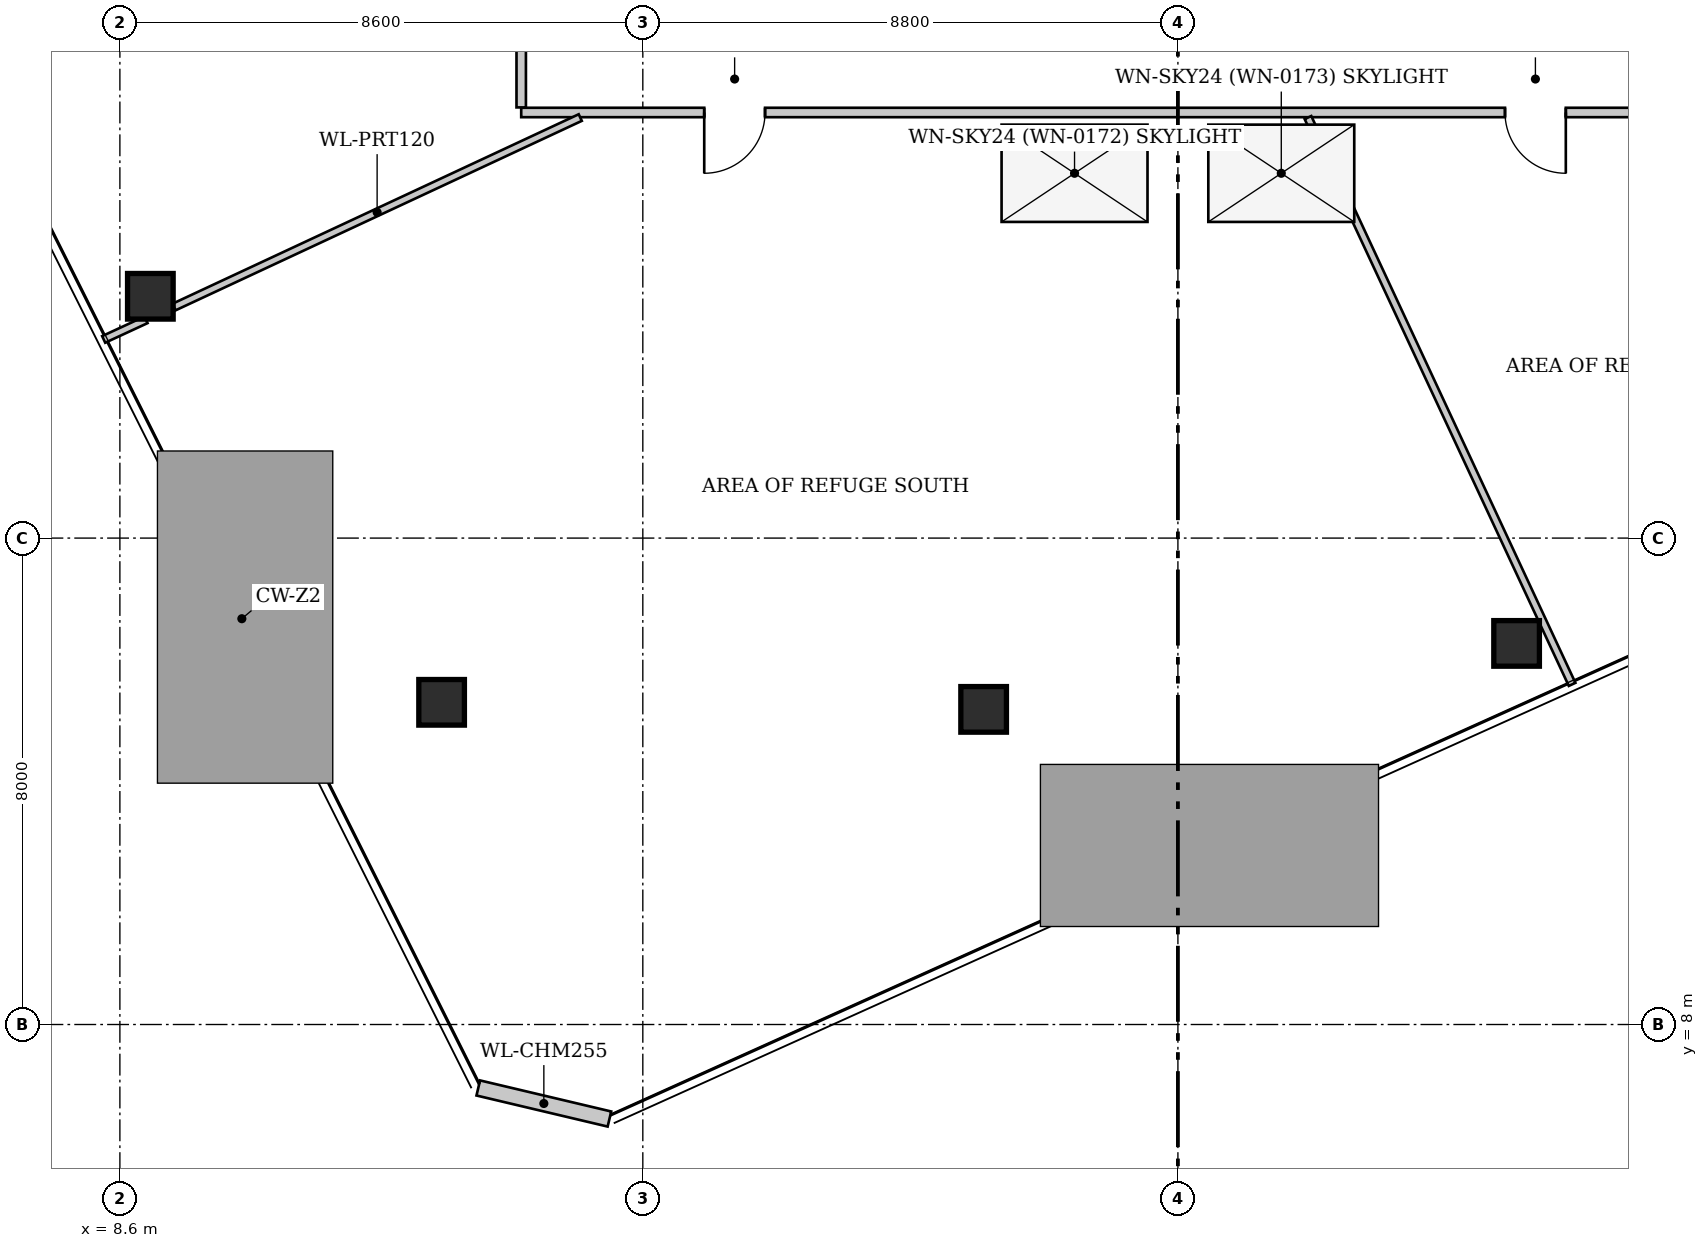
"""IFC4 building model, lengths in metres.
Left out: names, types, materials, properties, quantities, classifications, styles, units other than length and angle.
Written with IfcOpenShell. Run it as: python <this file> out.ifc"""

import sys

from ifc_helpers import new_model, si_unit, direction, frame, frame_2d, origin, origin_2d, place, context, subcontext, project, spatial, rectangle, hollow_rectangle, extrude, source, transform, mapped, element, fill, save


model = new_model("IFC4")
c1 = context("Model", 3, precision=1e-05, world=origin(), true_north=direction((0.0, 1.0)))
c2 = subcontext(c1, "Body", "Model", "MODEL_VIEW")
j1 = project(units=[si_unit("LENGTHUNIT", "METRE"), si_unit("PLANEANGLEUNIT", "RADIAN")], contexts=[c1])
p1 = place(None, origin())
s1 = spatial("IfcSite", under=j1, at=p1, CompositionType="ELEMENT")
p2 = place(p1, origin())
s2 = spatial("IfcBuilding", under=s1, at=p2, CompositionType="ELEMENT")
p3 = place(p2, frame((0.0, 0.0, 162.4)))
s3 = spatial("IfcBuildingStorey", under=s2, at=p3, CompositionType="ELEMENT", Elevation=162.4)
for number, where, z_axis, x_axis in (
    (1, (31.57, 14.268, 0.0), (0.0, 0.0, 1.0), (1.0, 0.0, 0.0)),
    (2, (22.805, 13.183, 0.0), (0.0, 0.0, 1.0), (1.0, 0.0, 0.0)),
    (3, (13.891, 13.299, 0.0), (0.0, 0.0, 1.0), (1.0, 0.0, 0.0)),
    (4, (9.101, 19.977, 0.0), (0.0, 0.0, 1.0), (1.0, 0.0, 0.0)),
):
    element("IfcColumn", number, at=place(p3, frame(where, z_axis=z_axis, x_axis=x_axis)), inside=s3, PredefinedType="COLUMN", context=c2, shape_type="SweptSolid", body=[
        extrude(hollow_rectangle(XDim=0.75, YDim=0.75, WallThickness=0.04, at=origin_2d()), origin(), (0.0, 0.0, 1.0), 4.15),
    ])
p4 = place(p3, frame((16.651, 6.445, 0.0), z_axis=(0.0, 0.0, 1.0), x_axis=(-0.973067936209, 0.230518527503, 0.0)))
e5 = element("IfcWall", 5, at=p4, inside=s3, PredefinedType="SOLIDWALL", context=c2, shape_type="SweptSolid", body=[
    extrude(rectangle(XDim=2.217, YDim=0.255, at=frame_2d((1.108, 0.0))), origin(), (0.0, 0.0, 1.0), 4.15),
])
p5 = place(p3, frame((35.717, 23.0, 0.0), z_axis=(0.0, 0.0, 1.0), x_axis=(-1.0, 0.0, 0.0)))
e6 = element("IfcWall", 6, at=p5, inside=s3, PredefinedType="PARTITIONING", context=c2, shape_type="SweptSolid", body=[
    extrude(rectangle(XDim=20.517, YDim=0.155, at=frame_2d((10.258, 0.0))), origin(), (0.0, 0.0, 1.0), 4.15),
])
p6 = place(p5, frame((16.507, 0.0, 0.0)))
e7 = element("IfcOpeningElement", 7, at=p6, cuts=e6, PredefinedType="OPENING", context=c2, shape_type="SweptSolid", body=[
    extrude(rectangle(XDim=1.0, YDim=2.15, at=frame_2d((0.5, 1.075))), frame((0.0, 0.087, 0.0), z_axis=(0.0, -1.0, 0.0), x_axis=(1.0, 0.0, 0.0)), (0.0, 0.0, 1.0), 0.175),
])
p7 = place(p5, frame((3.337, 0.0, 0.0)))
e8 = element("IfcOpeningElement", 8, at=p7, cuts=e6, PredefinedType="OPENING", context=c2, shape_type="SweptSolid", body=[
    extrude(rectangle(XDim=1.0, YDim=2.15, at=frame_2d((0.5, 1.075))), frame((0.0, 0.087, 0.0), z_axis=(0.0, -1.0, 0.0), x_axis=(1.0, 0.0, 0.0)), (0.0, 0.0, 1.0), 0.175),
])
p8 = place(p3, frame((15.2, 23.083, 0.0), z_axis=(0.0, 0.0, 1.0), x_axis=(0.0, 1.0, 0.0)))
e9 = element("IfcWall", 9, at=p8, inside=s3, PredefinedType="PARTITIONING", context=c2, shape_type="SweptSolid", body=[
    extrude(rectangle(XDim=18.19, YDim=0.155, at=frame_2d((9.095, 0.0))), origin(), (0.0, 0.0, 1.0), 4.15),
])
p9 = place(p8, frame((3.706, 0.0, 0.0)))
e10 = element("IfcOpeningElement", 10, at=p9, cuts=e9, PredefinedType="OPENING", context=c2, shape_type="SweptSolid", body=[
    extrude(rectangle(XDim=1.0, YDim=2.15, at=frame_2d((0.5, 1.075))), frame((0.0, 0.087, 0.0), z_axis=(0.0, -1.0, 0.0), x_axis=(1.0, 0.0, 0.0)), (0.0, 0.0, 1.0), 0.175),
])
p10 = place(p8, frame((12.492, 0.0, 0.0)))
e11 = element("IfcOpeningElement", 11, at=p10, cuts=e9, PredefinedType="OPENING", context=c2, shape_type="SweptSolid", body=[
    extrude(rectangle(XDim=1.0, YDim=2.15, at=frame_2d((0.5, 1.075))), frame((0.0, 0.087, 0.0), z_axis=(0.0, -1.0, 0.0), x_axis=(1.0, 0.0, 0.0)), (0.0, 0.0, 1.0), 0.175),
])
p11 = place(p3, frame((16.171, 22.917, 0.0), z_axis=(0.0, 0.0, 1.0), x_axis=(-0.906250813075, -0.422740421301, 0.0)))
e12 = element("IfcWall", 12, at=p11, inside=s3, PredefinedType="PARTITIONING", context=c2, shape_type="SweptSolid", body=[
    extrude(rectangle(XDim=7.372, YDim=0.12, at=frame_2d((3.686, 0.0))), origin(), (0.0, 0.0, 1.0), 2.725),
])
p12 = place(p3, frame((9.03, 19.59, 0.0), z_axis=(0.0, 0.0, 1.0), x_axis=(-0.907446695622, -0.420167222193, 0.0)))
e13 = element("IfcWall", 13, at=p12, inside=s3, PredefinedType="PARTITIONING", context=c2, shape_type="SweptSolid", body=[
    extrude(rectangle(XDim=0.768, YDim=0.12, at=frame_2d((0.384, 0.0))), origin(), (0.0, 0.0, 1.0), 4.15),
])
p13 = place(p3, frame((28.139, 22.917, 0.0), z_axis=(0.0, 0.0, 1.0), x_axis=(0.42234608786, -0.906434654054, 0.0)))
e14 = element("IfcWall", 14, at=p13, inside=s3, PredefinedType="PARTITIONING", context=c2, shape_type="SweptSolid", body=[
    extrude(rectangle(XDim=10.285, YDim=0.12, at=frame_2d((5.143, 0.0))), origin(), (0.0, 0.0, 1.0), 4.15),
])
p14 = place(p3, frame((0.0, 0.0, -0.35)))
p15 = place(p14, frame((24.3, 22.0, 0.3)))
e15 = element("IfcWindow", 15, at=p15, inside=s3, PartitioningType="SINGLE_PANEL", PredefinedType="SKYLIGHT", context=c2, shape_type="SweptSolid", body=[
    extrude(rectangle(XDim=2.4, YDim=1.6, at=origin_2d()), origin(), (0.0, 0.0, 1.0), 0.05),
])
p16 = place(p14, frame((27.7, 22.0, 0.3)))
e16 = element("IfcWindow", 16, at=p16, inside=s3, PartitioningType="SINGLE_PANEL", PredefinedType="SKYLIGHT", context=c2, shape_type="SweptSolid", body=[
    extrude(rectangle(XDim=2.4, YDim=1.6, at=origin_2d()), origin(), (0.0, 0.0, 1.0), 0.05),
])
m1 = source(origin(), c2, "Body", "SweptSolid", [
    extrude(rectangle(XDim=1.0, YDim=2.15, at=frame_2d((0.5, 1.075))), frame((0.0, 0.025, 0.0), z_axis=(0.0, -1.0, 0.0), x_axis=(1.0, 0.0, 0.0)), (0.0, 0.0, 1.0), 0.05),
])
p17 = place(p6, origin())
e17 = element("IfcDoor", 17, at=p17, inside=s3, OperationType="SINGLE_SWING_RIGHT", PredefinedType="DOOR", context=c2, shape_type="MappedRepresentation", body=[
    mapped(m1, transform((0.0, 0.0, 0.0), x_axis=(1.0, 0.0, 0.0), y_axis=(0.0, 1.0, 0.0), z_axis=(0.0, 0.0, 1.0), scale=1.0)),
])
fill(e7, e17)
p18 = place(p7, origin())
e18 = element("IfcDoor", 18, at=p18, inside=s3, OperationType="SINGLE_SWING_LEFT", PredefinedType="DOOR", context=c2, shape_type="MappedRepresentation", body=[
    mapped(m1, transform((0.0, 0.0, 0.0), x_axis=(1.0, 0.0, 0.0), y_axis=(0.0, 1.0, 0.0), z_axis=(0.0, 0.0, 1.0), scale=1.0)),
])
fill(e8, e18)
save(model, sys.argv[1])
